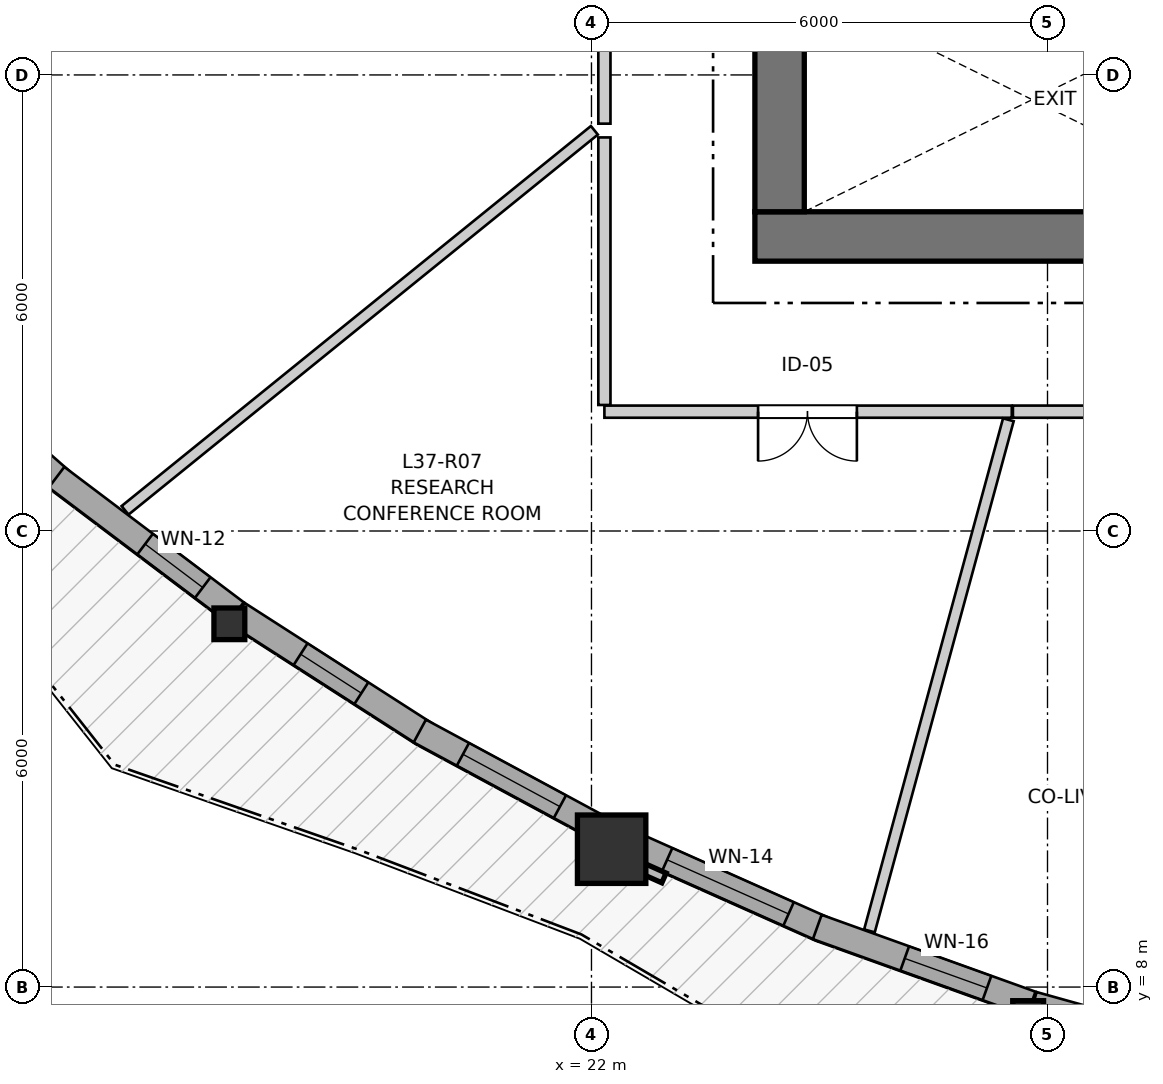
"""IFC4 building model, lengths in metres.
Left out: names, types, materials, properties, quantities, classifications, styles, units other than length and angle.
Written with IfcOpenShell. Run it as: python <this file> out.ifc"""

import sys

from ifc_helpers import new_model, si_unit, direction, frame, frame_2d, origin, origin_2d, place, context, subcontext, project, spatial, rectangle, i_section, extrude, source, transform, mapped, element, fill, save


model = new_model("IFC4")
c1 = context("Model", 3, precision=1e-05, world=origin(), true_north=direction((0.0, 1.0)))
c2 = subcontext(c1, "Body", "Model", "MODEL_VIEW")
j1 = project(units=[si_unit("LENGTHUNIT", "METRE"), si_unit("PLANEANGLEUNIT", "RADIAN")], contexts=[c1])
p1 = place(None, origin())
s1 = spatial("IfcSite", under=j1, at=p1, CompositionType="ELEMENT")
p2 = place(p1, origin())
s2 = spatial("IfcBuilding", under=s1, at=p2, CompositionType="ELEMENT")
p3 = place(p2, frame((0.0, 0.0, 124.8)))
s3 = spatial("IfcBuildingStorey", under=s2, at=p3, CompositionType="ELEMENT", Elevation=124.8)
p4 = place(p3, frame((24.15, 17.875, 0.0), z_axis=(0.0, 0.0, 1.0), x_axis=(1.0, 0.0, 0.0)))
e1 = element("IfcWall", 1, at=p4, inside=s3, PredefinedType="SHEAR", context=c2, shape_type="SweptSolid", body=[
    extrude(rectangle(XDim=12.4, YDim=0.65, at=frame_2d((6.2, 0.0))), origin(), (0.0, 0.0, 1.0), 2.9),
])
p5 = place(p3, frame((24.475, 33.8, 0.0), z_axis=(0.0, 0.0, 1.0), x_axis=(0.0, -1.0, 0.0)))
e2 = element("IfcWall", 2, at=p5, inside=s3, PredefinedType="SHEAR", context=c2, shape_type="SweptSolid", body=[
    extrude(rectangle(XDim=15.6, YDim=0.65, at=frame_2d((7.8, 0.0))), origin(), (0.0, 0.0, 1.0), 2.9),
])
p6 = place(p5, frame((7.05, 0.0, 0.0)))
e3 = element("IfcOpeningElement", 3, at=p6, cuts=e2, PredefinedType="OPENING", context=c2, shape_type="SweptSolid", body=[
    extrude(rectangle(XDim=1.5, YDim=2.15, at=frame_2d((0.75, 1.075))), frame((0.0, 0.335, 0.0), z_axis=(0.0, -1.0, 0.0), x_axis=(1.0, 0.0, 0.0)), (0.0, 0.0, 1.0), 0.67),
])
p7 = place(p5, frame((3.52, 0.0, 0.0)))
e4 = element("IfcOpeningElement", 4, at=p7, cuts=e2, PredefinedType="OPENING", context=c2, shape_type="SweptSolid", body=[
    extrude(rectangle(XDim=0.86, YDim=2.05, at=frame_2d((0.43, 1.025))), frame((0.0, 0.335, 0.0), z_axis=(0.0, -1.0, 0.0), x_axis=(1.0, 0.0, 0.0)), (0.0, 0.0, 1.0), 0.67),
])
p8 = place(p5, frame((11.22, 0.0, 0.0)))
e5 = element("IfcOpeningElement", 5, at=p8, cuts=e2, PredefinedType="OPENING", context=c2, shape_type="SweptSolid", body=[
    extrude(rectangle(XDim=0.86, YDim=2.05, at=frame_2d((0.43, 1.025))), frame((0.0, 0.335, 0.0), z_axis=(0.0, -1.0, 0.0), x_axis=(1.0, 0.0, 0.0)), (0.0, 0.0, 1.0), 0.67),
])
m1 = source(origin(), c2, "Body", "SweptSolid", [
    extrude(i_section(OverallWidth=0.406, OverallDepth=0.416, WebThickness=0.027, FlangeThickness=0.044, FilletRadius=0.015, at=origin_2d()), origin(), (0.0, 0.0, 1.0), 2.9),
])
p9 = place(p3, frame((17.236, 12.779, 0.0), z_axis=(0.0, 0.0, 1.0), x_axis=(1.0, 0.0, 0.0)))
e6 = element("IfcColumn", 6, at=p9, inside=s3, PredefinedType="PILASTER", context=c2, shape_type="MappedRepresentation", body=[
    mapped(m1, transform((0.0, 0.0, 0.0), x_axis=(1.0, 0.0, 0.0), y_axis=(0.0, 1.0, 0.0), z_axis=(0.0, 0.0, 1.0), scale=1.0)),
])
m2 = source(origin(), c2, "Body", "SweptSolid", [
    extrude(rectangle(XDim=0.9, YDim=0.9, at=origin_2d()), origin(), (0.0, 0.0, 1.0), 2.9),
])
p10 = place(p3, frame((22.265, 9.814, 0.0), z_axis=(0.0, 0.0, 1.0), x_axis=(1.0, 0.0, 0.0)))
e7 = element("IfcColumn", 7, at=p10, inside=s3, PredefinedType="COLUMN", context=c2, shape_type="MappedRepresentation", body=[
    mapped(m2, transform((0.0, 0.0, 0.0), x_axis=(1.0, 0.0, 0.0), y_axis=(0.0, 1.0, 0.0), z_axis=(0.0, 0.0, 1.0), scale=1.0)),
])
p11 = place(p3, frame((27.746, 7.613, 0.0), z_axis=(0.0, 0.0, 1.0), x_axis=(1.0, 0.0, 0.0)))
e8 = element("IfcColumn", 8, at=p11, inside=s3, PredefinedType="PILASTER", context=c2, shape_type="MappedRepresentation", body=[
    mapped(m1, transform((0.0, 0.0, 0.0), x_axis=(1.0, 0.0, 0.0), y_axis=(0.0, 1.0, 0.0), z_axis=(0.0, 0.0, 1.0), scale=1.0)),
])
p12 = place(p3, frame((12.942, 16.485, 0.0), z_axis=(0.0, 0.0, 1.0), x_axis=(0.751427478967, -0.659815689305, 0.0)))
e9 = element("IfcWall", 9, at=p12, inside=s3, PredefinedType="SOLIDWALL", context=c2, shape_type="SweptSolid", body=[
    extrude(rectangle(XDim=2.78, YDim=0.34, at=frame_2d((1.39, 0.0))), origin(), (0.0, 0.0, 1.0), 2.43),
])
p13 = place(p12, frame((0.685, 0.0, 0.82)))
e10 = element("IfcOpeningElement", 10, at=p13, cuts=e9, PredefinedType="OPENING", context=c2, shape_type="SweptSolid", body=[
    extrude(rectangle(XDim=1.4, YDim=1.35, at=frame_2d((0.7, 0.675))), frame((0.0, 0.18, 0.0), z_axis=(0.0, -1.0, 0.0), x_axis=(1.0, 0.0, 0.0)), (0.0, 0.0, 1.0), 0.36),
])
p14 = place(p3, frame((14.962, 14.707, 0.0), z_axis=(0.0, 0.0, 1.0), x_axis=(0.798341968257, -0.602204368732, 0.0)))
e11 = element("IfcWall", 11, at=p14, inside=s3, PredefinedType="SOLIDWALL", context=c2, shape_type="SweptSolid", body=[
    extrude(rectangle(XDim=2.956, YDim=0.34, at=frame_2d((1.478, 0.0))), origin(), (0.0, 0.0, 1.0), 2.43),
])
p15 = place(p14, frame((1.46, 0.0, 0.82)))
e12 = element("IfcOpeningElement", 12, at=p15, cuts=e11, PredefinedType="OPENING", context=c2, shape_type="SweptSolid", body=[
    extrude(rectangle(XDim=0.95, YDim=1.35, at=frame_2d((0.475, 0.675))), frame((0.0, 0.18, 0.0), z_axis=(0.0, -1.0, 0.0), x_axis=(1.0, 0.0, 0.0)), (0.0, 0.0, 1.0), 0.36),
])
p16 = place(p3, frame((17.344, 12.912, 0.0), z_axis=(0.0, 0.0, 1.0), x_axis=(0.841496750769, -0.540262175657, 0.0)))
e13 = element("IfcWall", 13, at=p16, inside=s3, PredefinedType="SOLIDWALL", context=c2, shape_type="SweptSolid", body=[
    extrude(rectangle(XDim=2.939, YDim=0.34, at=frame_2d((1.47, 0.0))), origin(), (0.0, 0.0, 1.0), 2.43),
])
p17 = place(p16, frame((0.985, 0.0, 0.82)))
e14 = element("IfcOpeningElement", 14, at=p17, cuts=e13, PredefinedType="OPENING", context=c2, shape_type="SweptSolid", body=[
    extrude(rectangle(XDim=0.95, YDim=1.35, at=frame_2d((0.475, 0.675))), frame((0.0, 0.18, 0.0), z_axis=(0.0, -1.0, 0.0), x_axis=(1.0, 0.0, 0.0)), (0.0, 0.0, 1.0), 0.36),
])
p18 = place(p3, frame((19.741, 11.369, 0.0), z_axis=(0.0, 0.0, 1.0), x_axis=(0.88007734826, -0.474830349788, 0.0)))
e15 = element("IfcWall", 15, at=p18, inside=s3, PredefinedType="SOLIDWALL", context=c2, shape_type="SweptSolid", body=[
    extrude(rectangle(XDim=2.73, YDim=0.34, at=frame_2d((1.365, 0.0))), origin(), (0.0, 0.0, 1.0), 2.43),
])
p19 = place(p18, frame((0.645, 0.0, 0.82)))
e16 = element("IfcOpeningElement", 16, at=p19, cuts=e15, PredefinedType="OPENING", context=c2, shape_type="SweptSolid", body=[
    extrude(rectangle(XDim=1.45, YDim=1.25, at=frame_2d((0.725, 0.625))), frame((0.0, 0.18, 0.0), z_axis=(0.0, -1.0, 0.0), x_axis=(1.0, 0.0, 0.0)), (0.0, 0.0, 1.0), 0.36),
])
p20 = place(p3, frame((22.544, 9.875, 0.0), z_axis=(0.0, 0.0, 1.0), x_axis=(0.913404185574, -0.407053797153, 0.0)))
e17 = element("IfcWall", 17, at=p20, inside=s3, PredefinedType="SOLIDWALL", context=c2, shape_type="SweptSolid", body=[
    extrude(rectangle(XDim=2.746, YDim=0.34, at=frame_2d((1.373, 0.0))), origin(), (0.0, 0.0, 1.0), 2.43),
])
p21 = place(p20, frame((0.493, 0.0, 0.82)))
e18 = element("IfcOpeningElement", 18, at=p21, cuts=e17, PredefinedType="OPENING", context=c2, shape_type="SweptSolid", body=[
    extrude(rectangle(XDim=1.75, YDim=1.3, at=frame_2d((0.875, 0.65))), frame((0.0, 0.18, 0.0), z_axis=(0.0, -1.0, 0.0), x_axis=(1.0, 0.0, 0.0)), (0.0, 0.0, 1.0), 0.36),
])
p22 = place(p3, frame((24.971, 8.79, 0.0), z_axis=(0.0, 0.0, 1.0), x_axis=(0.941086086789, -0.338167084814, 0.0)))
e19 = element("IfcWall", 19, at=p22, inside=s3, PredefinedType="SOLIDWALL", context=c2, shape_type="SweptSolid", body=[
    extrude(rectangle(XDim=2.99, YDim=0.34, at=frame_2d((1.495, 0.0))), origin(), (0.0, 0.0, 1.0), 2.43),
])
p23 = place(p22, frame((1.222, 0.0, 0.82)))
e20 = element("IfcOpeningElement", 20, at=p23, cuts=e19, PredefinedType="OPENING", context=c2, shape_type="SweptSolid", body=[
    extrude(rectangle(XDim=1.15, YDim=1.2, at=frame_2d((0.575, 0.6))), frame((0.0, 0.18, 0.0), z_axis=(0.0, -1.0, 0.0), x_axis=(1.0, 0.0, 0.0)), (0.0, 0.0, 1.0), 0.36),
])
p24 = place(p3, frame((27.811, 7.771, 0.0), z_axis=(0.0, 0.0, 1.0), x_axis=(0.963039905189, -0.269358758934, 0.0)))
e21 = element("IfcWall", 21, at=p24, inside=s3, PredefinedType="SOLIDWALL", context=c2, shape_type="SweptSolid", body=[
    extrude(rectangle(XDim=3.039, YDim=0.34, at=frame_2d((1.52, 0.0))), origin(), (0.0, 0.0, 1.0), 2.43),
])
p25 = place(p24, frame((0.935, 0.0, 0.82)))
e22 = element("IfcOpeningElement", 22, at=p25, cuts=e21, PredefinedType="OPENING", context=c2, shape_type="SweptSolid", body=[
    extrude(rectangle(XDim=1.15, YDim=1.2, at=frame_2d((0.575, 0.6))), frame((0.0, 0.18, 0.0), z_axis=(0.0, -1.0, 0.0), x_axis=(1.0, 0.0, 0.0)), (0.0, 0.0, 1.0), 0.36),
])
p26 = place(p3, frame((27.53, 15.57, 0.0), z_axis=(0.0, 0.0, 1.0), x_axis=(-1.0, 0.0, 0.0)))
e23 = element("IfcWall", 23, at=p26, inside=s3, PredefinedType="PARTITIONING", context=c2, shape_type="SweptSolid", body=[
    extrude(rectangle(XDim=5.36, YDim=0.16, at=frame_2d((2.68, 0.0))), origin(), (0.0, 0.0, 1.0), 2.9),
])
p27 = place(p26, frame((2.038, 0.0, 0.0)))
e24 = element("IfcOpeningElement", 24, at=p27, cuts=e23, PredefinedType="OPENING", context=c2, shape_type="SweptSolid", body=[
    extrude(rectangle(XDim=1.3, YDim=2.1, at=frame_2d((0.65, 1.05))), frame((0.0, 0.09, 0.0), z_axis=(0.0, -1.0, 0.0), x_axis=(1.0, 0.0, 0.0)), (0.0, 0.0, 1.0), 0.18),
])
p28 = place(p3, frame((22.17, 19.359, 0.0), z_axis=(0.0, 0.0, 1.0), x_axis=(0.0, 1.0, 0.0)))
e25 = element("IfcWall", 25, at=p28, inside=s3, PredefinedType="PARTITIONING", context=c2, shape_type="SweptSolid", body=[
    extrude(rectangle(XDim=4.791, YDim=0.16, at=frame_2d((2.396, 0.0))), origin(), (0.0, 0.0, 1.0), 2.9),
])
p29 = place(p28, frame((1.445, 0.0, 0.0)))
e26 = element("IfcOpeningElement", 26, at=p29, cuts=e25, PredefinedType="OPENING", context=c2, shape_type="SweptSolid", body=[
    extrude(rectangle(XDim=1.3, YDim=2.1, at=frame_2d((0.65, 1.05))), frame((0.0, 0.09, 0.0), z_axis=(0.0, -1.0, 0.0), x_axis=(1.0, 0.0, 0.0)), (0.0, 0.0, 1.0), 0.18),
])
p30 = place(p3, frame((31.224, 15.57, 0.0), z_axis=(0.0, 0.0, 1.0), x_axis=(-1.0, 0.0, 0.0)))
e27 = element("IfcWall", 27, at=p30, inside=s3, PredefinedType="PARTITIONING", context=c2, shape_type="SweptSolid", body=[
    extrude(rectangle(XDim=3.679, YDim=0.16, at=frame_2d((1.84, 0.0))), origin(), (0.0, 0.0, 1.0), 2.9),
])
p31 = place(p30, frame((1.212, 0.0, 0.0)))
e28 = element("IfcOpeningElement", 28, at=p31, cuts=e27, PredefinedType="OPENING", context=c2, shape_type="SweptSolid", body=[
    extrude(rectangle(XDim=1.3, YDim=2.1, at=frame_2d((0.65, 1.05))), frame((0.0, 0.09, 0.0), z_axis=(0.0, -1.0, 0.0), x_axis=(1.0, 0.0, 0.0)), (0.0, 0.0, 1.0), 0.18),
])
p32 = place(p3, frame((15.863, 14.272, 0.0), z_axis=(0.0, 0.0, 1.0), x_axis=(0.77720694169, 0.629245079273, 0.0)))
e29 = element("IfcWall", 29, at=p32, inside=s3, PredefinedType="PARTITIONING", context=c2, shape_type="SweptSolid", body=[
    extrude(rectangle(XDim=7.945, YDim=0.145, at=frame_2d((3.972, 0.0))), origin(), (0.0, 0.0, 1.0), 2.9),
])
p33 = place(p3, frame((25.657, 8.739, 0.0), z_axis=(0.0, 0.0, 1.0), x_axis=(0.26231095786, 0.964983399539, 0.0)))
e30 = element("IfcWall", 30, at=p33, inside=s3, PredefinedType="PARTITIONING", context=c2, shape_type="SweptSolid", body=[
    extrude(rectangle(XDim=6.968, YDim=0.145, at=frame_2d((3.484, 0.0))), origin(), (0.0, 0.0, 1.0), 2.9),
])
p34 = place(p3, frame((22.17, 15.658, 0.0), z_axis=(0.0, 0.0, 1.0), x_axis=(0.0, 1.0, 0.0)))
e31 = element("IfcWall", 31, at=p34, inside=s3, PredefinedType="PARTITIONING", context=c2, shape_type="SweptSolid", body=[
    extrude(rectangle(XDim=3.52, YDim=0.16, at=frame_2d((1.76, 0.0))), origin(), (0.0, 0.0, 1.0), 2.9),
])
m3 = source(origin(), c2, "Body", "SweptSolid", [
    extrude(rectangle(XDim=0.95, YDim=1.35, at=frame_2d((0.475, 0.675))), frame((0.0, 0.03, 0.0), z_axis=(0.0, -1.0, 0.0), x_axis=(1.0, 0.0, 0.0)), (0.0, 0.0, 1.0), 0.06),
])
p35 = place(p15, origin())
e32 = element("IfcWindow", 32, at=p35, inside=s3, PartitioningType="SINGLE_PANEL", PredefinedType="WINDOW", context=c2, shape_type="MappedRepresentation", body=[
    mapped(m3, transform((0.0, 0.0, 0.0), x_axis=(1.0, 0.0, 0.0), y_axis=(0.0, 1.0, 0.0), z_axis=(0.0, 0.0, 1.0), scale=1.0)),
])
fill(e12, e32)
p36 = place(p17, origin())
e33 = element("IfcWindow", 33, at=p36, inside=s3, PartitioningType="SINGLE_PANEL", PredefinedType="WINDOW", context=c2, shape_type="MappedRepresentation", body=[
    mapped(m3, transform((0.0, 0.0, 0.0), x_axis=(1.0, 0.0, 0.0), y_axis=(0.0, 1.0, 0.0), z_axis=(0.0, 0.0, 1.0), scale=1.0)),
])
fill(e14, e33)
m4 = source(origin(), c2, "Body", "SweptSolid", [
    extrude(rectangle(XDim=1.45, YDim=1.25, at=frame_2d((0.725, 0.625))), frame((0.0, 0.03, 0.0), z_axis=(0.0, -1.0, 0.0), x_axis=(1.0, 0.0, 0.0)), (0.0, 0.0, 1.0), 0.06),
])
p37 = place(p19, origin())
e34 = element("IfcWindow", 34, at=p37, inside=s3, PartitioningType="SINGLE_PANEL", PredefinedType="WINDOW", context=c2, shape_type="MappedRepresentation", body=[
    mapped(m4, transform((0.0, 0.0, 0.0), x_axis=(1.0, 0.0, 0.0), y_axis=(0.0, 1.0, 0.0), z_axis=(0.0, 0.0, 1.0), scale=1.0)),
])
fill(e16, e34)
m5 = source(origin(), c2, "Body", "SweptSolid", [
    extrude(rectangle(XDim=1.75, YDim=1.3, at=frame_2d((0.875, 0.65))), frame((0.0, 0.03, 0.0), z_axis=(0.0, -1.0, 0.0), x_axis=(1.0, 0.0, 0.0)), (0.0, 0.0, 1.0), 0.06),
])
p38 = place(p21, origin())
e35 = element("IfcWindow", 35, at=p38, inside=s3, PartitioningType="SINGLE_PANEL", PredefinedType="WINDOW", context=c2, shape_type="MappedRepresentation", body=[
    mapped(m5, transform((0.0, 0.0, 0.0), x_axis=(1.0, 0.0, 0.0), y_axis=(0.0, 1.0, 0.0), z_axis=(0.0, 0.0, 1.0), scale=1.0)),
])
fill(e18, e35)
m6 = source(origin(), c2, "Body", "SweptSolid", [
    extrude(rectangle(XDim=1.15, YDim=1.2, at=frame_2d((0.575, 0.6))), frame((0.0, 0.03, 0.0), z_axis=(0.0, -1.0, 0.0), x_axis=(1.0, 0.0, 0.0)), (0.0, 0.0, 1.0), 0.06),
])
p39 = place(p23, origin())
e36 = element("IfcWindow", 36, at=p39, inside=s3, PartitioningType="SINGLE_PANEL", PredefinedType="WINDOW", context=c2, shape_type="MappedRepresentation", body=[
    mapped(m6, transform((0.0, 0.0, 0.0), x_axis=(1.0, 0.0, 0.0), y_axis=(0.0, 1.0, 0.0), z_axis=(0.0, 0.0, 1.0), scale=1.0)),
])
fill(e20, e36)
m7 = source(origin(), c2, "Body", "SweptSolid", [
    extrude(rectangle(XDim=1.3, YDim=2.1, at=frame_2d((0.65, 1.05))), frame((0.0, 0.025, 0.0), z_axis=(0.0, -1.0, 0.0), x_axis=(1.0, 0.0, 0.0)), (0.0, 0.0, 1.0), 0.05),
])
p40 = place(p27, origin())
e37 = element("IfcDoor", 37, at=p40, inside=s3, OperationType="DOUBLE_DOOR_SINGLE_SWING", PredefinedType="DOOR", context=c2, shape_type="MappedRepresentation", body=[
    mapped(m7, transform((0.0, 0.0, 0.0), x_axis=(1.0, 0.0, 0.0), y_axis=(0.0, 1.0, 0.0), z_axis=(0.0, 0.0, 1.0), scale=1.0)),
])
fill(e24, e37)
save(model, sys.argv[1])
